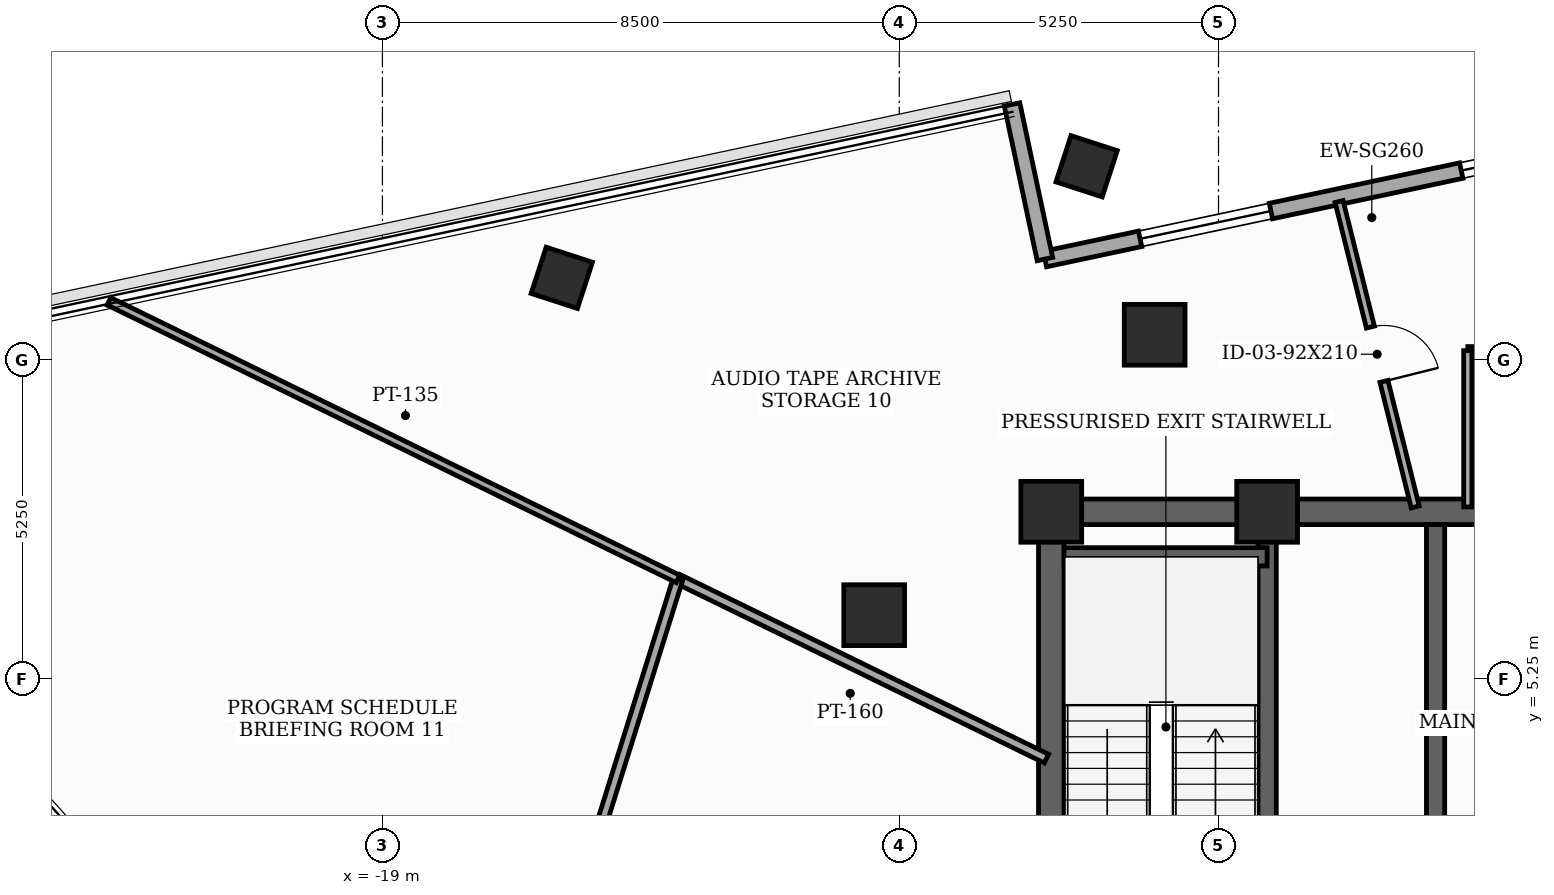
"""IFC4 building model, lengths in metres.
Left out: names, types, materials, properties, quantities, classifications, styles, units other than length and angle.
Written with IfcOpenShell. Run it as: python <this file> out.ifc"""

import sys

from ifc_helpers import new_model, si_unit, direction, frame, frame_2d, origin, origin_2d, place, context, subcontext, project, spatial, rectangle, extrude, element, fill, save


model = new_model("IFC4")
c1 = context("Model", 3, precision=1e-05, world=origin(), true_north=direction((0.0, 1.0)))
c2 = subcontext(c1, "Body", "Model", "MODEL_VIEW")
j1 = project(units=[si_unit("LENGTHUNIT", "METRE"), si_unit("PLANEANGLEUNIT", "RADIAN")], contexts=[c1])
p1 = place(None, origin())
s1 = spatial("IfcSite", under=j1, at=p1, CompositionType="ELEMENT")
p2 = place(p1, origin())
s2 = spatial("IfcBuilding", under=s1, at=p2, CompositionType="ELEMENT")
p3 = place(p2, frame((0.0, 0.0, 305.4)))
s3 = spatial("IfcBuildingStorey", under=s2, at=p3, CompositionType="ELEMENT", Elevation=305.4)
for number, where, z_axis, x_axis in (
    (1, (-4.45, 8.0, 0.0), (0.0, 0.0, 1.0), (1.0, 0.0, 0.0)),
    (2, (-8.0, 8.0, 0.0), (0.0, 0.0, 1.0), (1.0, 0.0, 0.0)),
    (3, (-6.3, 10.912, 0.0), (0.0, 0.0, 1.0), (1.0, 0.0, 0.0)),
    (4, (-10.912, 6.3, 0.0), (0.0, 0.0, 1.0), (1.0, 0.0, 0.0)),
):
    element("IfcColumn", number, at=place(p3, frame(where, z_axis=z_axis, x_axis=x_axis)), inside=s3, PredefinedType="COLUMN", context=c2, shape_type="SweptSolid", body=[
        extrude(rectangle(XDim=1.0, YDim=1.0, at=origin_2d()), origin(), (0.0, 0.0, 1.0), 3.7),
    ])
for number, where, z_axis, x_axis in (
    (5, (-7.419, 13.683, 0.0), (0.0, 0.0, 1.0), (0.309, 0.951, 0.0)),
    (6, (-16.05, 11.848, 0.0), (0.0, 0.0, 1.0), (0.309, 0.951, 0.0)),
):
    element("IfcColumn", number, at=place(p3, frame(where, z_axis=z_axis, x_axis=x_axis)), inside=s3, PredefinedType="COLUMN", context=c2, shape_type="SweptSolid", body=[
        extrude(rectangle(XDim=0.8, YDim=0.8, at=origin_2d()), origin(), (0.0, 0.0, 1.0), 3.7),
    ])
p4 = place(p3, frame((2.459, 14.402, 0.0), z_axis=(0.0, 0.0, 1.0), x_axis=(-0.978149082982, -0.207904717268, 0.0)))
e7 = element("IfcWall", 7, at=p4, inside=s3, PredefinedType="SOLIDWALL", context=c2, shape_type="SweptSolid", body=[
    extrude(rectangle(XDim=10.8, YDim=0.26, at=frame_2d((5.4, 0.0))), origin(), (0.0, 0.0, 1.0), 3.5),
])
p5 = place(p4, frame((1.6, 0.0, 0.85)))
e8 = element("IfcOpeningElement", 8, at=p5, cuts=e7, PredefinedType="OPENING", context=c2, shape_type="SweptSolid", body=[
    extrude(rectangle(XDim=2.2, YDim=1.25, at=frame_2d((1.1, 0.625))), frame((0.0, 0.14, 0.0), z_axis=(0.0, -1.0, 0.0), x_axis=(1.0, 0.0, 0.0)), (0.0, 0.0, 1.0), 0.28),
])
p6 = place(p4, frame((7.0, 0.0, 0.85)))
e9 = element("IfcOpeningElement", 9, at=p6, cuts=e7, PredefinedType="OPENING", context=c2, shape_type="SweptSolid", body=[
    extrude(rectangle(XDim=2.2, YDim=1.25, at=frame_2d((1.1, 0.625))), frame((0.0, 0.14, 0.0), z_axis=(0.0, -1.0, 0.0), x_axis=(1.0, 0.0, 0.0)), (0.0, 0.0, 1.0), 0.28),
])
p7 = place(p3, frame((-8.105, 12.157, 0.0), z_axis=(0.0, 0.0, 1.0), x_axis=(-0.207893569688, 0.978151452323, 0.0)))
e10 = element("IfcWall", 10, at=p7, inside=s3, PredefinedType="SOLIDWALL", context=c2, shape_type="SweptSolid", body=[
    extrude(rectangle(XDim=2.6, YDim=0.26, at=frame_2d((1.3, 0.0))), origin(), (0.0, 0.0, 1.0), 3.5),
])
p8 = place(p3, frame((-8.0, -8.0, 0.0), z_axis=(0.0, 0.0, 1.0), x_axis=(0.0, 1.0, 0.0)))
e11 = element("IfcWall", 11, at=p8, inside=s3, PredefinedType="SHEAR", context=c2, shape_type="SweptSolid", body=[
    extrude(rectangle(XDim=16.0, YDim=0.42, at=frame_2d((8.0, 0.0))), origin(), (0.0, 0.0, 1.0), 3.5),
])
p9 = place(p8, frame((0.681, 0.0, 0.0)))
e12 = element("IfcOpeningElement", 12, at=p9, cuts=e11, PredefinedType="OPENING", context=c2, shape_type="SweptSolid", body=[
    extrude(rectangle(XDim=0.85, YDim=2.02, at=frame_2d((0.425, 1.01))), frame((0.0, 0.22, 0.0), z_axis=(0.0, -1.0, 0.0), x_axis=(1.0, 0.0, 0.0)), (0.0, 0.0, 1.0), 0.44),
])
p10 = place(p8, frame((5.35, 0.0, 0.0)))
e13 = element("IfcOpeningElement", 13, at=p10, cuts=e11, PredefinedType="OPENING", context=c2, shape_type="SweptSolid", body=[
    extrude(rectangle(XDim=1.05, YDim=2.15, at=frame_2d((0.525, 1.075))), frame((0.0, 0.22, 0.0), z_axis=(0.0, -1.0, 0.0), x_axis=(1.0, 0.0, 0.0)), (0.0, 0.0, 1.0), 0.44),
])
p11 = place(p3, frame((-8.0, 8.0, 0.0), z_axis=(0.0, 0.0, 1.0), x_axis=(1.0, 0.0, 0.0)))
e14 = element("IfcWall", 14, at=p11, inside=s3, PredefinedType="SHEAR", context=c2, shape_type="SweptSolid", body=[
    extrude(rectangle(XDim=16.0, YDim=0.42, at=frame_2d((8.0, 0.0))), origin(), (0.0, 0.0, 1.0), 3.5),
])
p12 = place(p11, frame((7.1, 0.0, 0.0)))
e15 = element("IfcOpeningElement", 15, at=p12, cuts=e14, PredefinedType="OPENING", context=c2, shape_type="SweptSolid", body=[
    extrude(rectangle(XDim=1.8, YDim=2.15, at=frame_2d((0.9, 1.075))), frame((0.0, 0.22, 0.0), z_axis=(0.0, -1.0, 0.0), x_axis=(1.0, 0.0, 0.0)), (0.0, 0.0, 1.0), 0.44),
])
p13 = place(p3, frame((-4.45, -7.79, 0.0), z_axis=(0.0, 0.0, 1.0), x_axis=(0.0, 1.0, 0.0)))
e16 = element("IfcWall", 16, at=p13, inside=s3, PredefinedType="SHEAR", context=c2, shape_type="SweptSolid", body=[
    extrude(rectangle(XDim=15.58, YDim=0.3, at=frame_2d((7.79, 0.0))), origin(), (0.0, 0.0, 1.0), 3.5),
])
p14 = place(p3, frame((-7.79, 7.26, 0.0), z_axis=(0.0, 0.0, 1.0), x_axis=(1.0, 0.0, 0.0)))
e17 = element("IfcWall", 17, at=p14, inside=s3, PredefinedType="SHEAR", context=c2, shape_type="SweptSolid", body=[
    extrude(rectangle(XDim=3.34, YDim=0.3, at=frame_2d((1.67, 0.0))), origin(), (0.0, 0.0, 1.0), 3.5),
])
p15 = place(p3, frame((-1.68, -4.85, 0.0), z_axis=(0.0, 0.0, 1.0), x_axis=(0.0, 1.0, 0.0)))
e18 = element("IfcWall", 18, at=p15, inside=s3, PredefinedType="SHEAR", context=c2, shape_type="SweptSolid", body=[
    extrude(rectangle(XDim=12.64, YDim=0.3, at=frame_2d((6.32, 0.0))), origin(), (0.0, 0.0, 1.0), 3.5),
])
p16 = place(p15, frame((1.05, 0.0, 0.0)))
e19 = element("IfcOpeningElement", 19, at=p16, cuts=e18, PredefinedType="OPENING", context=c2, shape_type="SweptSolid", body=[
    extrude(rectangle(XDim=0.85, YDim=2.02, at=frame_2d((0.425, 1.01))), frame((0.0, 0.16, 0.0), z_axis=(0.0, -1.0, 0.0), x_axis=(1.0, 0.0, 0.0)), (0.0, 0.0, 1.0), 0.32),
])
p17 = place(p15, frame((6.8, 0.0, 0.0)))
e20 = element("IfcOpeningElement", 20, at=p17, cuts=e18, PredefinedType="OPENING", context=c2, shape_type="SweptSolid", body=[
    extrude(rectangle(XDim=0.95, YDim=2.1, at=frame_2d((0.475, 1.05))), frame((0.0, 0.16, 0.0), z_axis=(0.0, -1.0, 0.0), x_axis=(1.0, 0.0, 0.0)), (0.0, 0.0, 1.0), 0.32),
])
p18 = place(p3, frame((5.194, 10.65, 0.0), z_axis=(0.0, 0.0, 1.0), x_axis=(-1.0, 0.0, 0.0)))
e21 = element("IfcWall", 21, at=p18, inside=s3, PredefinedType="PARTITIONING", context=c2, shape_type="SweptSolid", body=[
    extrude(rectangle(XDim=6.344, YDim=0.135, at=frame_2d((3.172, 0.0))), origin(), (0.0, 0.0, 1.0), 2.885),
])
p19 = place(p18, frame((2.697, 0.0, 0.0)))
e22 = element("IfcOpeningElement", 22, at=p19, cuts=e21, PredefinedType="OPENING", context=c2, shape_type="SweptSolid", body=[
    extrude(rectangle(XDim=0.95, YDim=2.1, at=frame_2d((0.475, 1.05))), frame((0.0, 0.077, 0.0), z_axis=(0.0, -1.0, 0.0), x_axis=(1.0, 0.0, 0.0)), (0.0, 0.0, 1.0), 0.155),
])
p20 = place(p3, frame((-1.15, 10.65, 0.0), z_axis=(0.0, 0.0, 1.0), x_axis=(0.0, -1.0, 0.0)))
e23 = element("IfcWall", 23, at=p20, inside=s3, PredefinedType="PARTITIONING", context=c2, shape_type="SweptSolid", body=[
    extrude(rectangle(XDim=2.57, YDim=0.135, at=frame_2d((1.285, 0.0))), origin(), (0.0, 0.0, 1.0), 2.885),
])
p21 = place(p3, frame((-8.08, 3.941, 0.0), z_axis=(0.0, 0.0, 1.0), x_axis=(-0.898780627628, 0.438398658074, 0.0)))
e24 = element("IfcWall", 24, at=p21, inside=s3, PredefinedType="PARTITIONING", context=c2, shape_type="SweptSolid", body=[
    extrude(rectangle(XDim=6.741, YDim=0.16, at=frame_2d((3.371, 0.0))), origin(), (0.0, 0.0, 1.0), 2.885),
])
p22 = place(p3, frame((-14.139, 6.896, 0.0), z_axis=(0.0, 0.0, 1.0), x_axis=(-0.298099863076, -0.954534688544, 0.0)))
e25 = element("IfcWall", 25, at=p22, inside=s3, PredefinedType="PARTITIONING", context=c2, shape_type="SweptSolid", body=[
    extrude(rectangle(XDim=5.16, YDim=0.16, at=frame_2d((2.58, 0.0))), origin(), (0.0, 0.0, 1.0), 3.5),
])
p23 = place(p3, frame((-3.267, 13.104, 0.0), z_axis=(0.0, 0.0, 1.0), x_axis=(0.241825418424, -0.970319775643, 0.0)))
e26 = element("IfcWall", 26, at=p23, inside=s3, PredefinedType="PARTITIONING", context=c2, shape_type="SweptSolid", body=[
    extrude(rectangle(XDim=5.177, YDim=0.135, at=frame_2d((2.588, 0.0))), origin(), (0.0, 0.0, 1.0), 2.885),
])
p24 = place(p23, frame((2.129, 0.0, 0.0)))
e27 = element("IfcOpeningElement", 27, at=p24, cuts=e26, PredefinedType="OPENING", context=c2, shape_type="SweptSolid", body=[
    extrude(rectangle(XDim=0.92, YDim=2.1, at=frame_2d((0.46, 1.05))), frame((0.0, 0.077, 0.0), z_axis=(0.0, -1.0, 0.0), x_axis=(1.0, 0.0, 0.0)), (0.0, 0.0, 1.0), 0.155),
])
p25 = place(p3, frame((-23.498, 11.461, 0.0), z_axis=(0.0, 0.0, 1.0), x_axis=(0.898777683883, -0.438404693125, 0.0)))
e28 = element("IfcWall", 28, at=p25, inside=s3, PredefinedType="PARTITIONING", context=c2, shape_type="SweptSolid", body=[
    extrude(rectangle(XDim=10.413, YDim=0.135, at=frame_2d((5.207, 0.0))), origin(), (0.0, 0.0, 1.0), 3.035),
])
p26 = place(p5, origin())
e29 = element("IfcWindow", 29, at=p26, inside=s3, PartitioningType="SINGLE_PANEL", PredefinedType="WINDOW", context=c2, shape_type="SweptSolid", body=[
    extrude(rectangle(XDim=2.2, YDim=1.25, at=frame_2d((1.1, 0.625))), frame((0.0, 0.03, 0.0), z_axis=(0.0, -1.0, 0.0), x_axis=(1.0, 0.0, 0.0)), (0.0, 0.0, 1.0), 0.06),
])
fill(e8, e29)
p27 = place(p6, origin())
e30 = element("IfcWindow", 30, at=p27, inside=s3, PartitioningType="SINGLE_PANEL", PredefinedType="WINDOW", context=c2, shape_type="SweptSolid", body=[
    extrude(rectangle(XDim=2.2, YDim=1.25, at=frame_2d((1.1, 0.625))), frame((0.0, 0.03, 0.0), z_axis=(0.0, -1.0, 0.0), x_axis=(1.0, 0.0, 0.0)), (0.0, 0.0, 1.0), 0.06),
])
fill(e9, e30)
p28 = place(p24, origin())
e31 = element("IfcDoor", 31, at=p28, inside=s3, OperationType="SINGLE_SWING_RIGHT", PredefinedType="DOOR", context=c2, shape_type="SweptSolid", body=[
    extrude(rectangle(XDim=0.92, YDim=2.1, at=frame_2d((0.46, 1.05))), frame((0.0, 0.025, 0.0), z_axis=(0.0, -1.0, 0.0), x_axis=(1.0, 0.0, 0.0)), (0.0, 0.0, 1.0), 0.05),
])
fill(e27, e31)
save(model, sys.argv[1])
